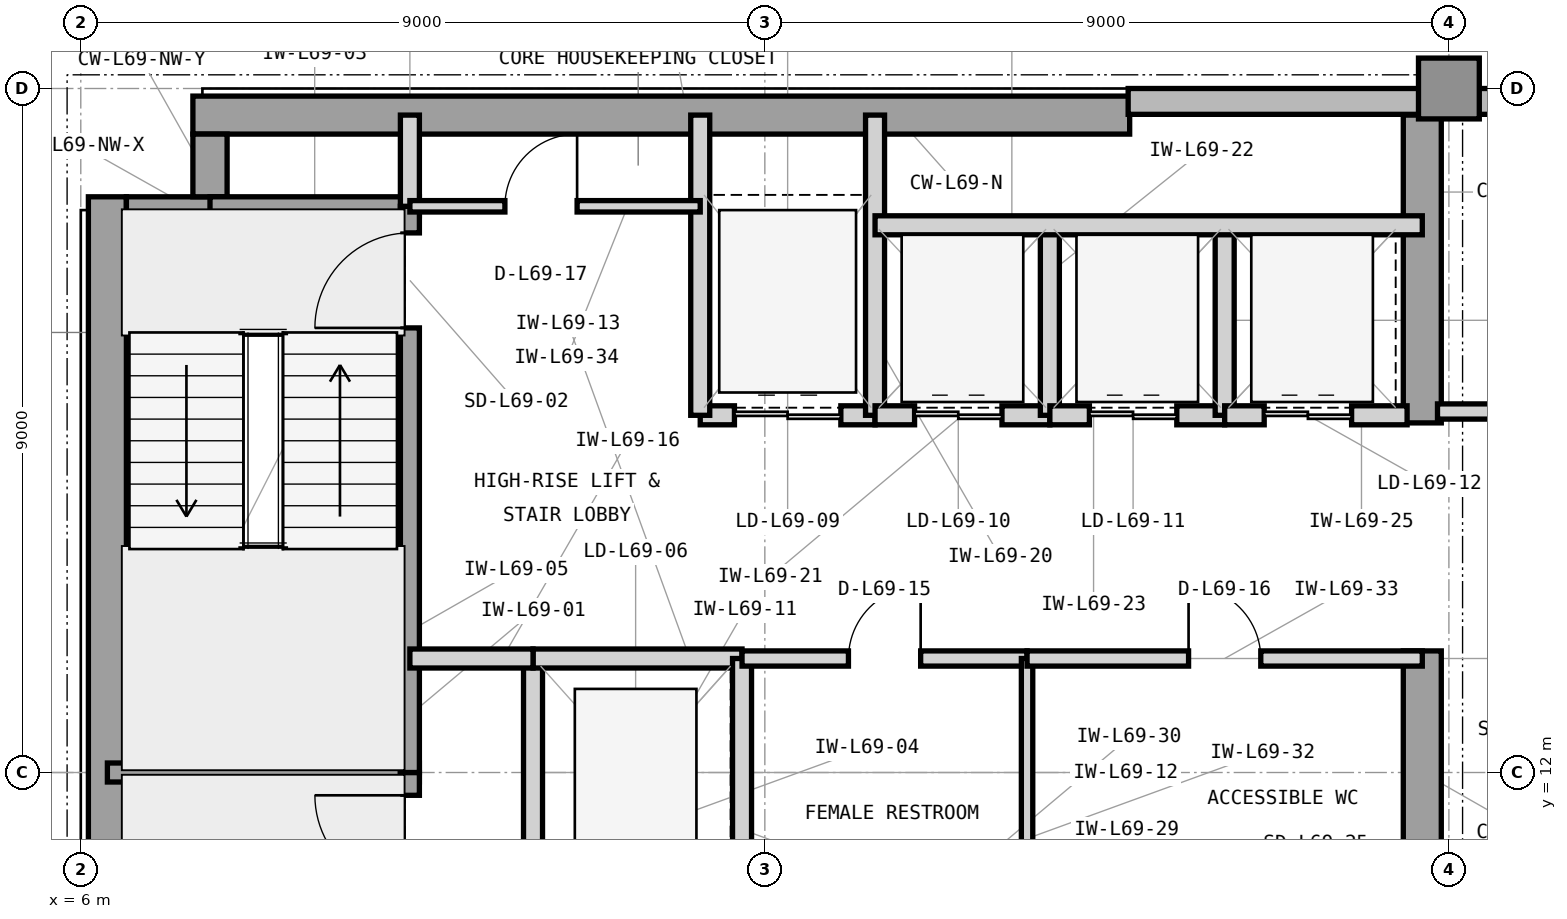
"""IFC4 building model, lengths in metres.
Left out: names, types, materials, properties, quantities, classifications, styles, units other than length and angle.
Written with IfcOpenShell. Run it as: python <this file> out.ifc"""

import sys

from ifc_helpers import new_model, si_unit, direction, frame, frame_2d, origin, origin_2d, place, context, subcontext, project, spatial, rectangle, extrude, element, fill, save


model = new_model("IFC4")
c1 = context("Model", 3, precision=1e-05, world=origin(), true_north=direction((0.0, 1.0)))
c2 = subcontext(c1, "Body", "Model", "MODEL_VIEW")
j1 = project(units=[si_unit("LENGTHUNIT", "METRE"), si_unit("PLANEANGLEUNIT", "RADIAN")], contexts=[c1])
p1 = place(None, origin())
s1 = spatial("IfcSite", under=j1, at=p1, CompositionType="ELEMENT")
p2 = place(p1, origin())
s2 = spatial("IfcBuilding", under=s1, at=p2, CompositionType="ELEMENT")
p3 = place(p2, frame((0.0, 0.0, 282.0)))
s3 = spatial("IfcBuildingStorey", under=s2, at=p3, CompositionType="ELEMENT", Elevation=282.0)
p4 = place(p3, frame((6.35, 4.425, 0.0), z_axis=(0.0, 0.0, 1.0), x_axis=(0.0, 1.0, 0.0)))
e1 = element("IfcWall", 1, at=p4, inside=s3, PredefinedType="SHEAR", context=c2, shape_type="SweptSolid", body=[
    extrude(rectangle(XDim=15.15, YDim=0.5, at=frame_2d((7.575, 0.0))), origin(), (0.0, 0.0, 1.0), 3.9),
])
p5 = place(p3, frame((7.475, 20.65, 0.0), z_axis=(0.0, 0.0, 1.0), x_axis=(1.0, 0.0, 0.0)))
e2 = element("IfcWall", 2, at=p5, inside=s3, PredefinedType="SHEAR", context=c2, shape_type="SweptSolid", body=[
    extrude(rectangle(XDim=12.325, YDim=0.5, at=frame_2d((6.163, 0.0))), origin(), (0.0, 0.0, 1.0), 3.9),
])
p6 = place(p3, frame((23.65, 10.4, 0.0), z_axis=(0.0, 0.0, 1.0), x_axis=(0.0, 1.0, 0.0)))
e3 = element("IfcWall", 3, at=p6, inside=s3, PredefinedType="SHEAR", context=c2, shape_type="SweptSolid", body=[
    extrude(rectangle(XDim=3.2, YDim=0.5, at=frame_2d((1.6, 0.0))), origin(), (0.0, 0.0, 1.0), 3.9),
])
p7 = place(p3, frame((23.65, 16.6, 0.0), z_axis=(0.0, 0.0, 1.0), x_axis=(0.0, 1.0, 0.0)))
e4 = element("IfcWall", 4, at=p7, inside=s3, PredefinedType="SHEAR", context=c2, shape_type="SweptSolid", body=[
    extrude(rectangle(XDim=4.05, YDim=0.5, at=frame_2d((2.025, 0.0))), origin(), (0.0, 0.0, 1.0), 3.9),
])
p8 = place(p3, frame((6.6, 19.35, 0.0), z_axis=(0.0, 0.0, 1.0), x_axis=(1.0, 0.0, 0.0)))
e5 = element("IfcWall", 5, at=p8, inside=s3, PredefinedType="SHEAR", context=c2, shape_type="SweptSolid", body=[
    extrude(rectangle(XDim=1.325, YDim=0.45, at=frame_2d((0.663, 0.0))), origin(), (0.0, 0.0, 1.0), 3.9),
])
p9 = place(p3, frame((7.7, 19.575, 0.0), z_axis=(0.0, 0.0, 1.0), x_axis=(0.0, 1.0, 0.0)))
e6 = element("IfcWall", 6, at=p9, inside=s3, PredefinedType="SHEAR", context=c2, shape_type="SweptSolid", body=[
    extrude(rectangle(XDim=0.825, YDim=0.45, at=frame_2d((0.413, 0.0))), origin(), (0.0, 0.0, 1.0), 3.9),
])
p10 = place(p3, frame((24.0, 21.0, 0.0), z_axis=(0.0, 0.0, 1.0), x_axis=(1.0, 0.0, 0.0)))
e7 = element("IfcColumn", 7, at=p10, inside=s3, PredefinedType="COLUMN", context=c2, shape_type="SweptSolid", body=[
    extrude(rectangle(XDim=0.8, YDim=0.8, at=origin_2d()), origin(), (0.0, 0.0, 1.0), 3.9),
])
p11 = place(p3, frame((52.4, 20.83, 0.0), z_axis=(0.0, 0.0, 1.0), x_axis=(-1.0, 0.0, 0.0)))
e8 = element("IfcWall", 8, at=p11, inside=s3, PredefinedType="STANDARD", context=c2, shape_type="SweptSolid", body=[
    extrude(rectangle(XDim=32.62, YDim=0.34, at=frame_2d((16.31, 0.0))), origin(), (0.0, 0.0, 1.0), 3.715),
])
p12 = place(p11, frame((5.69, 0.0, 0.8)))
e9 = element("IfcOpeningElement", 9, at=p12, cuts=e8, PredefinedType="OPENING", context=c2, shape_type="SweptSolid", body=[
    extrude(rectangle(XDim=2.6, YDim=2.35, at=frame_2d((1.3, 1.175))), frame((0.0, 0.18, 0.0), z_axis=(0.0, -1.0, 0.0), x_axis=(1.0, 0.0, 0.0)), (0.0, 0.0, 1.0), 0.36),
])
p13 = place(p11, frame((15.01, 0.0, 0.8)))
e10 = element("IfcOpeningElement", 10, at=p13, cuts=e8, PredefinedType="OPENING", context=c2, shape_type="SweptSolid", body=[
    extrude(rectangle(XDim=2.6, YDim=2.35, at=frame_2d((1.3, 1.175))), frame((0.0, 0.18, 0.0), z_axis=(0.0, -1.0, 0.0), x_axis=(1.0, 0.0, 0.0)), (0.0, 0.0, 1.0), 0.36),
])
p14 = place(p11, frame((24.33, 0.0, 0.8)))
e11 = element("IfcOpeningElement", 11, at=p14, cuts=e8, PredefinedType="OPENING", context=c2, shape_type="SweptSolid", body=[
    extrude(rectangle(XDim=2.6, YDim=2.35, at=frame_2d((1.3, 1.175))), frame((0.0, 0.18, 0.0), z_axis=(0.0, -1.0, 0.0), x_axis=(1.0, 0.0, 0.0)), (0.0, 0.0, 1.0), 0.36),
])
p15 = place(p3, frame((6.35, 12.0, 0.0), z_axis=(0.0, 0.0, 1.0), x_axis=(1.0, 0.0, 0.0)))
e12 = element("IfcWall", 12, at=p15, inside=s3, PredefinedType="SHEAR", context=c2, shape_type="SweptSolid", body=[
    extrude(rectangle(XDim=4.105, YDim=0.25, at=frame_2d((2.052, 0.0))), origin(), (0.0, 0.0, 1.0), 3.9),
])
p16 = place(p3, frame((7.7, 19.45, 0.0), z_axis=(0.0, 0.0, 1.0), x_axis=(1.0, 0.0, 0.0)))
e13 = element("IfcWall", 13, at=p16, inside=s3, PredefinedType="SHEAR", context=c2, shape_type="SweptSolid", body=[
    extrude(rectangle(XDim=2.755, YDim=0.25, at=frame_2d((1.377, 0.0))), origin(), (0.0, 0.0, 1.0), 3.9),
])
p17 = place(p3, frame((10.33, 4.55, 0.0), z_axis=(0.0, 0.0, 1.0), x_axis=(0.0, 1.0, 0.0)))
e14 = element("IfcWall", 14, at=p17, inside=s3, PredefinedType="SHEAR", context=c2, shape_type="SweptSolid", body=[
    extrude(rectangle(XDim=7.45, YDim=0.25, at=frame_2d((3.725, 0.0))), origin(), (0.0, 0.0, 1.0), 3.9),
])
p18 = place(p17, frame((5.9, 0.0, 0.0)))
e15 = element("IfcOpeningElement", 15, at=p18, cuts=e14, PredefinedType="OPENING", context=c2, shape_type="SweptSolid", body=[
    extrude(rectangle(XDim=1.25, YDim=2.2, at=frame_2d((0.625, 1.1))), frame((0.0, 0.135, 0.0), z_axis=(0.0, -1.0, 0.0), x_axis=(1.0, 0.0, 0.0)), (0.0, 0.0, 1.0), 0.27),
])
p19 = place(p3, frame((10.33, 12.0, 0.0), z_axis=(0.0, 0.0, 1.0), x_axis=(0.0, 1.0, 0.0)))
e16 = element("IfcWall", 16, at=p19, inside=s3, PredefinedType="SHEAR", context=c2, shape_type="SweptSolid", body=[
    extrude(rectangle(XDim=7.45, YDim=0.25, at=frame_2d((3.725, 0.0))), origin(), (0.0, 0.0, 1.0), 3.9),
])
p20 = place(p19, frame((5.85, 0.0, 0.0)))
e17 = element("IfcOpeningElement", 17, at=p20, cuts=e16, PredefinedType="OPENING", context=c2, shape_type="SweptSolid", body=[
    extrude(rectangle(XDim=1.25, YDim=2.2, at=frame_2d((0.625, 1.1))), frame((0.0, 0.135, 0.0), z_axis=(0.0, -1.0, 0.0), x_axis=(1.0, 0.0, 0.0)), (0.0, 0.0, 1.0), 0.27),
])
p21 = place(p3, frame((10.33, 19.45, 0.0), z_axis=(0.0, 0.0, 1.0), x_axis=(0.0, 1.0, 0.0)))
e18 = element("IfcWall", 18, at=p21, inside=s3, PredefinedType="PARTITIONING", context=c2, shape_type="SweptSolid", body=[
    extrude(rectangle(XDim=1.2, YDim=0.25, at=frame_2d((0.6, 0.0))), origin(), (0.0, 0.0, 1.0), 3.63),
])
p22 = place(p3, frame((11.95, 10.5, 0.0), z_axis=(0.0, 0.0, 1.0), x_axis=(0.0, 1.0, 0.0)))
e19 = element("IfcWall", 19, at=p22, inside=s3, PredefinedType="PARTITIONING", context=c2, shape_type="SweptSolid", body=[
    extrude(rectangle(XDim=3.0, YDim=0.25, at=frame_2d((1.5, 0.0))), origin(), (0.0, 0.0, 1.0), 3.63),
])
p23 = place(p3, frame((11.95, 13.5, 0.0), z_axis=(0.0, 0.0, 1.0), x_axis=(1.0, 0.0, 0.0)))
e20 = element("IfcWall", 20, at=p23, inside=s3, PredefinedType="PARTITIONING", context=c2, shape_type="SweptSolid", body=[
    extrude(rectangle(XDim=2.75, YDim=0.25, at=frame_2d((1.375, 0.0))), origin(), (0.0, 0.0, 1.0), 3.354),
])
p24 = place(p3, frame((14.7, 10.5, 0.0), z_axis=(0.0, 0.0, 1.0), x_axis=(0.0, 1.0, 0.0)))
e21 = element("IfcWall", 21, at=p24, inside=s3, PredefinedType="PARTITIONING", context=c2, shape_type="SweptSolid", body=[
    extrude(rectangle(XDim=3.0, YDim=0.25, at=frame_2d((1.5, 0.0))), origin(), (0.0, 0.0, 1.0), 3.63),
])
p25 = place(p3, frame((10.33, 13.5, 0.0), z_axis=(0.0, 0.0, 1.0), x_axis=(1.0, 0.0, 0.0)))
e22 = element("IfcWall", 22, at=p25, inside=s3, PredefinedType="PARTITIONING", context=c2, shape_type="SweptSolid", body=[
    extrude(rectangle(XDim=1.62, YDim=0.25, at=frame_2d((0.81, 0.0))), origin(), (0.0, 0.0, 1.0), 3.354),
])
p26 = place(p3, frame((14.15, 16.7, 0.0), z_axis=(0.0, 0.0, 1.0), x_axis=(1.0, 0.0, 0.0)))
e23 = element("IfcWall", 23, at=p26, inside=s3, PredefinedType="PARTITIONING", context=c2, shape_type="SweptSolid", body=[
    extrude(rectangle(XDim=2.3, YDim=0.25, at=frame_2d((1.15, 0.0))), origin(), (0.0, 0.0, 1.0), 3.354),
])
p27 = place(p26, frame((0.45, 0.0, 0.0)))
e24 = element("IfcOpeningElement", 24, at=p27, cuts=e23, PredefinedType="OPENING", context=c2, shape_type="SweptSolid", body=[
    extrude(rectangle(XDim=1.4, YDim=2.35, at=frame_2d((0.7, 1.175))), frame((0.0, 0.135, 0.0), z_axis=(0.0, -1.0, 0.0), x_axis=(1.0, 0.0, 0.0)), (0.0, 0.0, 1.0), 0.27),
])
for number, where, z_axis, x_axis in (
    (25, (14.15, 16.7, 0.0), (0.0, 0.0, 1.0), (0.0, 1.0, 0.0)),
    (26, (16.45, 16.7, 0.0), (0.0, 0.0, 1.0), (0.0, 1.0, 0.0)),
):
    element("IfcWall", number, at=place(p3, frame(where, z_axis=z_axis, x_axis=x_axis)), inside=s3, PredefinedType="PARTITIONING", context=c2, shape_type="SweptSolid", body=[
        extrude(rectangle(XDim=3.95, YDim=0.25, at=frame_2d((1.975, 0.0))), origin(), (0.0, 0.0, 1.0), 3.63),
    ])
p28 = place(p3, frame((16.45, 16.7, 0.0), z_axis=(0.0, 0.0, 1.0), x_axis=(1.0, 0.0, 0.0)))
e27 = element("IfcWall", 27, at=p28, inside=s3, PredefinedType="PARTITIONING", context=c2, shape_type="SweptSolid", body=[
    extrude(rectangle(XDim=2.3, YDim=0.25, at=frame_2d((1.15, 0.0))), origin(), (0.0, 0.0, 1.0), 3.354),
])
p29 = place(p28, frame((0.52, 0.0, 0.0)))
e28 = element("IfcOpeningElement", 28, at=p29, cuts=e27, PredefinedType="OPENING", context=c2, shape_type="SweptSolid", body=[
    extrude(rectangle(XDim=1.15, YDim=2.25, at=frame_2d((0.575, 1.125))), frame((0.0, 0.135, 0.0), z_axis=(0.0, -1.0, 0.0), x_axis=(1.0, 0.0, 0.0)), (0.0, 0.0, 1.0), 0.27),
])
p30 = place(p3, frame((18.75, 16.7, 0.0), z_axis=(0.0, 0.0, 1.0), x_axis=(0.0, 1.0, 0.0)))
e29 = element("IfcWall", 29, at=p30, inside=s3, PredefinedType="PARTITIONING", context=c2, shape_type="SweptSolid", body=[
    extrude(rectangle(XDim=2.5, YDim=0.25, at=frame_2d((1.25, 0.0))), origin(), (0.0, 0.0, 1.0), 3.63),
])
p31 = place(p3, frame((18.75, 16.7, 0.0), z_axis=(0.0, 0.0, 1.0), x_axis=(1.0, 0.0, 0.0)))
e30 = element("IfcWall", 30, at=p31, inside=s3, PredefinedType="PARTITIONING", context=c2, shape_type="SweptSolid", body=[
    extrude(rectangle(XDim=2.3, YDim=0.25, at=frame_2d((1.15, 0.0))), origin(), (0.0, 0.0, 1.0), 3.354),
])
p32 = place(p31, frame((0.52, 0.0, 0.0)))
e31 = element("IfcOpeningElement", 31, at=p32, cuts=e30, PredefinedType="OPENING", context=c2, shape_type="SweptSolid", body=[
    extrude(rectangle(XDim=1.15, YDim=2.25, at=frame_2d((0.575, 1.125))), frame((0.0, 0.135, 0.0), z_axis=(0.0, -1.0, 0.0), x_axis=(1.0, 0.0, 0.0)), (0.0, 0.0, 1.0), 0.27),
])
p33 = place(p3, frame((21.05, 16.7, 0.0), z_axis=(0.0, 0.0, 1.0), x_axis=(0.0, 1.0, 0.0)))
e32 = element("IfcWall", 32, at=p33, inside=s3, PredefinedType="PARTITIONING", context=c2, shape_type="SweptSolid", body=[
    extrude(rectangle(XDim=2.5, YDim=0.25, at=frame_2d((1.25, 0.0))), origin(), (0.0, 0.0, 1.0), 3.63),
])
p34 = place(p3, frame((21.05, 16.7, 0.0), z_axis=(0.0, 0.0, 1.0), x_axis=(1.0, 0.0, 0.0)))
e33 = element("IfcWall", 33, at=p34, inside=s3, PredefinedType="PARTITIONING", context=c2, shape_type="SweptSolid", body=[
    extrude(rectangle(XDim=2.4, YDim=0.25, at=frame_2d((1.2, 0.0))), origin(), (0.0, 0.0, 1.0), 3.354),
])
p35 = place(p34, frame((0.52, 0.0, 0.0)))
e34 = element("IfcOpeningElement", 34, at=p35, cuts=e33, PredefinedType="OPENING", context=c2, shape_type="SweptSolid", body=[
    extrude(rectangle(XDim=1.15, YDim=2.25, at=frame_2d((0.575, 1.125))), frame((0.0, 0.135, 0.0), z_axis=(0.0, -1.0, 0.0), x_axis=(1.0, 0.0, 0.0)), (0.0, 0.0, 1.0), 0.27),
])
p36 = place(p3, frame((16.45, 19.2, 0.0), z_axis=(0.0, 0.0, 1.0), x_axis=(1.0, 0.0, 0.0)))
e35 = element("IfcWall", 35, at=p36, inside=s3, PredefinedType="PARTITIONING", context=c2, shape_type="SweptSolid", body=[
    extrude(rectangle(XDim=7.2, YDim=0.25, at=frame_2d((3.6, 0.0))), origin(), (0.0, 0.0, 1.0), 3.63),
])
p37 = place(p3, frame((14.7, 13.5, 0.0), z_axis=(0.0, 0.0, 1.0), x_axis=(1.0, 0.0, 0.0)))
e36 = element("IfcWall", 36, at=p37, inside=s3, PredefinedType="PARTITIONING", context=c2, shape_type="SweptSolid", body=[
    extrude(rectangle(XDim=3.75, YDim=0.2, at=frame_2d((1.875, 0.0))), origin(), (0.0, 0.0, 1.0), 3.354),
])
p38 = place(p37, frame((1.4, 0.0, 0.0)))
e37 = element("IfcOpeningElement", 37, at=p38, cuts=e36, PredefinedType="OPENING", context=c2, shape_type="SweptSolid", body=[
    extrude(rectangle(XDim=0.95, YDim=2.1, at=frame_2d((0.475, 1.05))), frame((0.0, 0.11, 0.0), z_axis=(0.0, -1.0, 0.0), x_axis=(1.0, 0.0, 0.0)), (0.0, 0.0, 1.0), 0.22),
])
p39 = place(p3, frame((18.45, 10.34, 0.0), z_axis=(0.0, 0.0, 1.0), x_axis=(0.0, 1.0, 0.0)))
e38 = element("IfcWall", 38, at=p39, inside=s3, PredefinedType="PARTITIONING", context=c2, shape_type="SweptSolid", body=[
    extrude(rectangle(XDim=3.16, YDim=0.15, at=frame_2d((1.58, 0.0))), origin(), (0.0, 0.0, 1.0), 3.63),
])
p40 = place(p3, frame((18.45, 13.5, 0.0), z_axis=(0.0, 0.0, 1.0), x_axis=(1.0, 0.0, 0.0)))
e39 = element("IfcWall", 39, at=p40, inside=s3, PredefinedType="PARTITIONING", context=c2, shape_type="SweptSolid", body=[
    extrude(rectangle(XDim=5.2, YDim=0.2, at=frame_2d((2.6, 0.0))), origin(), (0.0, 0.0, 1.0), 3.354),
])
p41 = place(p40, frame((2.125, 0.0, 0.0)))
e40 = element("IfcOpeningElement", 40, at=p41, cuts=e39, PredefinedType="OPENING", context=c2, shape_type="SweptSolid", body=[
    extrude(rectangle(XDim=0.95, YDim=2.1, at=frame_2d((0.475, 1.05))), frame((0.0, 0.11, 0.0), z_axis=(0.0, -1.0, 0.0), x_axis=(1.0, 0.0, 0.0)), (0.0, 0.0, 1.0), 0.22),
])
p42 = place(p3, frame((10.33, 19.45, 0.0), z_axis=(0.0, 0.0, 1.0), x_axis=(1.0, 0.0, 0.0)))
e41 = element("IfcWall", 41, at=p42, inside=s3, PredefinedType="PARTITIONING", context=c2, shape_type="SweptSolid", body=[
    extrude(rectangle(XDim=3.82, YDim=0.15, at=frame_2d((1.91, 0.0))), origin(), (0.0, 0.0, 1.0), 3.63),
])
p43 = place(p42, frame((1.25, 0.0, 0.0)))
e42 = element("IfcOpeningElement", 42, at=p43, cuts=e41, PredefinedType="OPENING", context=c2, shape_type="SweptSolid", body=[
    extrude(rectangle(XDim=0.95, YDim=2.1, at=frame_2d((0.475, 1.05))), frame((0.0, 0.085, 0.0), z_axis=(0.0, -1.0, 0.0), x_axis=(1.0, 0.0, 0.0)), (0.0, 0.0, 1.0), 0.17),
])
p44 = place(p3, frame((23.85, 16.75, 0.0), z_axis=(0.0, 0.0, 1.0), x_axis=(1.0, 0.0, 0.0)))
e43 = element("IfcWall", 43, at=p44, inside=s3, PredefinedType="PARTITIONING", context=c2, shape_type="SweptSolid", body=[
    extrude(rectangle(XDim=7.35, YDim=0.2, at=frame_2d((3.675, 0.0))), origin(), (0.0, 0.0, 1.0), 3.63),
])
p45 = place(p44, frame((2.8, 0.0, 0.0)))
e44 = element("IfcOpeningElement", 44, at=p45, cuts=e43, PredefinedType="OPENING", context=c2, shape_type="SweptSolid", body=[
    extrude(rectangle(XDim=1.0, YDim=2.15, at=frame_2d((0.5, 1.075))), frame((0.0, 0.11, 0.0), z_axis=(0.0, -1.0, 0.0), x_axis=(1.0, 0.0, 0.0)), (0.0, 0.0, 1.0), 0.22),
])
p46 = place(p18, origin())
e45 = element("IfcDoor", 45, at=p46, inside=s3, OperationType="SINGLE_SWING_RIGHT", PredefinedType="DOOR", context=c2, shape_type="SweptSolid", body=[
    extrude(rectangle(XDim=1.25, YDim=2.2, at=frame_2d((0.625, 1.1))), frame((0.0, 0.025, 0.0), z_axis=(0.0, -1.0, 0.0), x_axis=(1.0, 0.0, 0.0)), (0.0, 0.0, 1.0), 0.05),
])
fill(e15, e45)
p47 = place(p20, origin())
e46 = element("IfcDoor", 46, at=p47, inside=s3, OperationType="SINGLE_SWING_LEFT", PredefinedType="DOOR", context=c2, shape_type="SweptSolid", body=[
    extrude(rectangle(XDim=1.25, YDim=2.2, at=frame_2d((0.625, 1.1))), frame((0.0, 0.025, 0.0), z_axis=(0.0, -1.0, 0.0), x_axis=(1.0, 0.0, 0.0)), (0.0, 0.0, 1.0), 0.05),
])
fill(e17, e46)
p48 = place(p27, origin())
e47 = element("IfcDoor", 47, at=p48, inside=s3, OperationType="DOUBLE_DOOR_SLIDING", PredefinedType="DOOR", context=c2, shape_type="SweptSolid", body=[
    extrude(rectangle(XDim=1.4, YDim=2.35, at=frame_2d((0.7, 1.175))), frame((0.0, 0.025, 0.0), z_axis=(0.0, -1.0, 0.0), x_axis=(1.0, 0.0, 0.0)), (0.0, 0.0, 1.0), 0.05),
])
fill(e24, e47)
p49 = place(p29, origin())
e48 = element("IfcDoor", 48, at=p49, inside=s3, OperationType="DOUBLE_DOOR_SLIDING", PredefinedType="DOOR", context=c2, shape_type="SweptSolid", body=[
    extrude(rectangle(XDim=1.15, YDim=2.25, at=frame_2d((0.575, 1.125))), frame((0.0, 0.025, 0.0), z_axis=(0.0, -1.0, 0.0), x_axis=(1.0, 0.0, 0.0)), (0.0, 0.0, 1.0), 0.05),
])
fill(e28, e48)
p50 = place(p32, origin())
e49 = element("IfcDoor", 49, at=p50, inside=s3, OperationType="DOUBLE_DOOR_SLIDING", PredefinedType="DOOR", context=c2, shape_type="SweptSolid", body=[
    extrude(rectangle(XDim=1.15, YDim=2.25, at=frame_2d((0.575, 1.125))), frame((0.0, 0.025, 0.0), z_axis=(0.0, -1.0, 0.0), x_axis=(1.0, 0.0, 0.0)), (0.0, 0.0, 1.0), 0.05),
])
fill(e31, e49)
p51 = place(p35, origin())
e50 = element("IfcDoor", 50, at=p51, inside=s3, OperationType="DOUBLE_DOOR_SLIDING", PredefinedType="DOOR", context=c2, shape_type="SweptSolid", body=[
    extrude(rectangle(XDim=1.15, YDim=2.25, at=frame_2d((0.575, 1.125))), frame((0.0, 0.025, 0.0), z_axis=(0.0, -1.0, 0.0), x_axis=(1.0, 0.0, 0.0)), (0.0, 0.0, 1.0), 0.05),
])
fill(e34, e50)
p52 = place(p38, origin())
e51 = element("IfcDoor", 51, at=p52, inside=s3, OperationType="SINGLE_SWING_RIGHT", PredefinedType="DOOR", context=c2, shape_type="SweptSolid", body=[
    extrude(rectangle(XDim=0.95, YDim=2.1, at=frame_2d((0.475, 1.05))), frame((0.0, 0.025, 0.0), z_axis=(0.0, -1.0, 0.0), x_axis=(1.0, 0.0, 0.0)), (0.0, 0.0, 1.0), 0.05),
])
fill(e37, e51)
p53 = place(p41, origin())
e52 = element("IfcDoor", 52, at=p53, inside=s3, OperationType="SINGLE_SWING_LEFT", PredefinedType="DOOR", context=c2, shape_type="SweptSolid", body=[
    extrude(rectangle(XDim=0.95, YDim=2.1, at=frame_2d((0.475, 1.05))), frame((0.0, 0.025, 0.0), z_axis=(0.0, -1.0, 0.0), x_axis=(1.0, 0.0, 0.0)), (0.0, 0.0, 1.0), 0.05),
])
fill(e40, e52)
p54 = place(p43, origin())
e53 = element("IfcDoor", 53, at=p54, inside=s3, OperationType="SINGLE_SWING_RIGHT", PredefinedType="DOOR", context=c2, shape_type="SweptSolid", body=[
    extrude(rectangle(XDim=0.95, YDim=2.1, at=frame_2d((0.475, 1.05))), frame((0.0, 0.025, 0.0), z_axis=(0.0, -1.0, 0.0), x_axis=(1.0, 0.0, 0.0)), (0.0, 0.0, 1.0), 0.05),
])
fill(e42, e53)
save(model, sys.argv[1])
